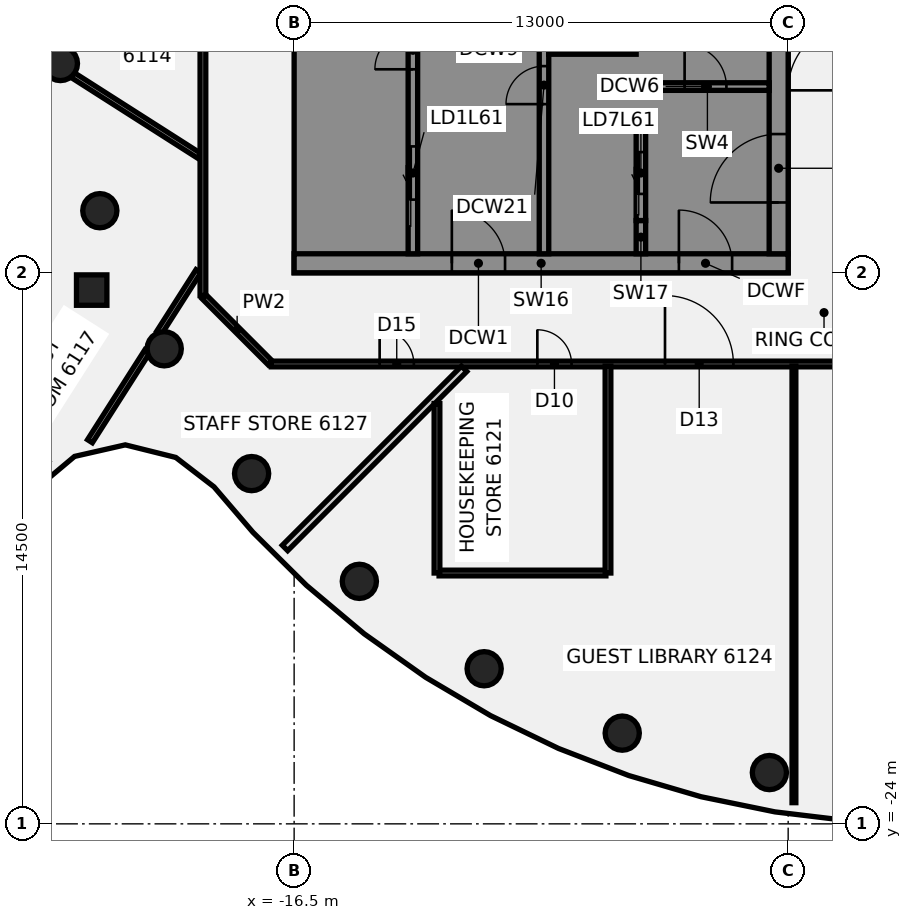
"""IFC4 building model, lengths in metres.
Left out: names, types, materials, properties, quantities, classifications, styles, units other than length and angle.
Written with IfcOpenShell. Run it as: python <this file> out.ifc"""

import sys

from ifc_helpers import new_model, si_unit, direction, frame, frame_2d, origin, origin_2d, place, context, subcontext, project, spatial, polyline, rectangle, circle, outline, extrude, element, fill, save


model = new_model("IFC4")
c1 = context("Model", 3, precision=1e-05, world=origin(), true_north=direction((0.0, 1.0)))
c2 = subcontext(c1, "Body", "Model", "MODEL_VIEW")
j1 = project(units=[si_unit("LENGTHUNIT", "METRE"), si_unit("PLANEANGLEUNIT", "RADIAN")], contexts=[c1])
p1 = place(None, origin())
s1 = spatial("IfcSite", under=j1, at=p1, CompositionType="ELEMENT")
p2 = place(p1, origin())
s2 = spatial("IfcBuilding", under=s1, at=p2, CompositionType="ELEMENT")
p3 = place(p2, frame((0.0, 0.0, 241.5)))
s3 = spatial("IfcBuildingStorey", under=s2, at=p3, CompositionType="ELEMENT", Elevation=241.5)
for number, where, z_axis, x_axis in (
    (1, (-22.651, -3.994, -0.14), (0.0, 0.0, 1.0), (1.0, 0.0, 0.0)),
    (2, (-21.613, -7.866, -0.14), (0.0, 0.0, 1.0), (1.0, 0.0, 0.0)),
    (3, (-19.919, -11.5, -0.14), (0.0, 0.0, 1.0), (1.0, 0.0, 0.0)),
    (4, (-17.619, -14.784, -0.14), (0.0, 0.0, 1.0), (1.0, 0.0, 0.0)),
    (5, (-14.784, -17.619, -0.14), (0.0, 0.0, 1.0), (1.0, 0.0, 0.0)),
    (6, (-11.5, -19.919, -0.14), (0.0, 0.0, 1.0), (1.0, 0.0, 0.0)),
    (7, (-7.866, -21.613, -0.14), (0.0, 0.0, 1.0), (1.0, 0.0, 0.0)),
    (8, (-3.994, -22.651, -0.14), (0.0, 0.0, 1.0), (1.0, 0.0, 0.0)),
):
    element("IfcColumn", number, at=place(p3, frame(where, z_axis=z_axis, x_axis=x_axis)), inside=s3, PredefinedType="COLUMN", context=c2, shape_type="SweptSolid", body=[
        extrude(circle(Radius=0.45, at=origin_2d()), origin(), (0.0, 0.0, 1.0), 3.6),
    ])
p4 = place(p3, frame((-21.827, -9.955, -0.139), z_axis=(0.050360136255, 0.001287809675, 0.998730293033), x_axis=(-0.841513383158, 0.538621535495, 0.041738081745)))
e9 = element("IfcColumn", 9, at=p4, inside=s3, PredefinedType="COLUMN", context=c2, shape_type="SweptSolid", body=[
    extrude(rectangle(XDim=0.8, YDim=0.8, at=origin_2d()), origin(), (0.0, 0.0, 1.0), 3.602),
])
p5 = place(p3, frame((-18.872, -10.128, 0.0), z_axis=(0.0, 0.0, 1.0), x_axis=(0.707106781187, -0.707106781187, 0.0)))
e10 = element("IfcWall", 10, at=p5, inside=s3, PredefinedType="PARTITIONING", context=c2, shape_type="SweptSolid", body=[
    extrude(rectangle(XDim=2.465, YDim=0.15, at=frame_2d((1.232, 0.0))), origin(), (0.0, 0.0, 1.0), 2.864),
])
p6 = place(p3, frame((-22.327, -4.298, 0.0), z_axis=(0.0, 0.0, 1.0), x_axis=(0.843073070403, -0.537799031201, 0.0)))
e11 = element("IfcWall", 11, at=p6, inside=s3, PredefinedType="PARTITIONING", context=c2, shape_type="SweptSolid", body=[
    extrude(rectangle(XDim=3.95, YDim=0.15, at=frame_2d((1.975, 0.0))), origin(), (0.0, 0.0, 1.0), 2.864),
])
p7 = place(p3, frame((-17.1, -11.9, 0.0), z_axis=(0.0, 0.0, 1.0), x_axis=(1.0, 0.0, 0.0)))
e12 = element("IfcWall", 12, at=p7, inside=s3, PredefinedType="PARTITIONING", context=c2, shape_type="SweptSolid", body=[
    extrude(rectangle(XDim=34.165, YDim=0.15, at=frame_2d((17.083, 0.0))), origin(), (0.0, 0.0, 1.0), 2.864),
])
p8 = place(p7, frame((7.0, 0.0, 0.0)))
e13 = element("IfcOpeningElement", 13, at=p8, cuts=e12, PredefinedType="OPENING", context=c2, shape_type="SweptSolid", body=[
    extrude(rectangle(XDim=0.9, YDim=2.1, at=frame_2d((0.45, 1.05))), frame((0.0, 0.085, 0.0), z_axis=(0.0, -1.0, 0.0), x_axis=(1.0, 0.0, 0.0)), (0.0, 0.0, 1.0), 0.17),
])
p9 = place(p7, frame((26.941, 0.0, 0.0)))
e14 = element("IfcOpeningElement", 14, at=p9, cuts=e12, PredefinedType="OPENING", context=c2, shape_type="SweptSolid", body=[
    extrude(rectangle(XDim=0.9, YDim=2.1, at=frame_2d((0.45, 1.05))), frame((0.0, 0.085, 0.0), z_axis=(0.0, -1.0, 0.0), x_axis=(1.0, 0.0, 0.0)), (0.0, 0.0, 1.0), 0.17),
])
p10 = place(p7, frame((19.152, 0.0, 0.0)))
e15 = element("IfcOpeningElement", 15, at=p10, cuts=e12, PredefinedType="OPENING", context=c2, shape_type="SweptSolid", body=[
    extrude(rectangle(XDim=1.8, YDim=2.1, at=frame_2d((0.9, 1.05))), frame((0.0, 0.085, 0.0), z_axis=(0.0, -1.0, 0.0), x_axis=(1.0, 0.0, 0.0)), (0.0, 0.0, 1.0), 0.17),
])
p11 = place(p7, frame((10.359, 0.0, 0.0)))
e16 = element("IfcOpeningElement", 16, at=p11, cuts=e12, PredefinedType="OPENING", context=c2, shape_type="SweptSolid", body=[
    extrude(rectangle(XDim=1.8, YDim=2.1, at=frame_2d((0.9, 1.05))), frame((0.0, 0.085, 0.0), z_axis=(0.0, -1.0, 0.0), x_axis=(1.0, 0.0, 0.0)), (0.0, 0.0, 1.0), 0.17),
])
p12 = place(p7, frame((31.7, 0.0, 0.0)))
e17 = element("IfcOpeningElement", 17, at=p12, cuts=e12, PredefinedType="OPENING", context=c2, shape_type="SweptSolid", body=[
    extrude(rectangle(XDim=0.9, YDim=2.1, at=frame_2d((0.45, 1.05))), frame((0.0, 0.085, 0.0), z_axis=(0.0, -1.0, 0.0), x_axis=(1.0, 0.0, 0.0)), (0.0, 0.0, 1.0), 0.17),
])
p13 = place(p7, frame((2.85, 0.0, 0.0)))
e18 = element("IfcOpeningElement", 18, at=p13, cuts=e12, PredefinedType="OPENING", context=c2, shape_type="SweptSolid", body=[
    extrude(rectangle(XDim=0.9, YDim=2.1, at=frame_2d((0.45, 1.05))), frame((0.0, 0.085, 0.0), z_axis=(0.0, -1.0, 0.0), x_axis=(1.0, 0.0, 0.0)), (0.0, 0.0, 1.0), 0.17),
])
p14 = place(p3, frame((-12.686, -17.4, 0.0), z_axis=(0.0, 0.0, 1.0), x_axis=(1.0, 0.0, 0.0)))
e19 = element("IfcWall", 19, at=p14, inside=s3, PredefinedType="PARTITIONING", context=c2, shape_type="SweptSolid", body=[
    extrude(rectangle(XDim=4.39, YDim=0.15, at=frame_2d((2.195, 0.0))), origin(), (0.0, 0.0, 1.0), 2.864),
])
p15 = place(p3, frame((-16.74, -16.74, 0.0), z_axis=(0.0, 0.0, 1.0), x_axis=(0.707106781187, 0.707106781187, 0.0)))
e20 = element("IfcWall", 20, at=p15, inside=s3, PredefinedType="PARTITIONING", context=c2, shape_type="SweptSolid", body=[
    extrude(rectangle(XDim=6.665, YDim=0.2, at=frame_2d((3.333, 0.0))), origin(), (0.0, 0.0, 1.0), 2.864),
])
p16 = place(p3, frame((-21.873, -13.932, 0.0), z_axis=(0.0, 0.0, 1.0), x_axis=(0.537802916329, 0.843070592055, 0.0)))
e21 = element("IfcWall", 21, at=p16, inside=s3, PredefinedType="PARTITIONING", context=c2, shape_type="SweptSolid", body=[
    extrude(rectangle(XDim=2.81, YDim=0.15, at=frame_2d((1.405, 0.0))), origin(), (0.0, 0.0, 1.0), 2.864),
])
p17 = place(p3, frame((-20.051, -11.075, 0.0), z_axis=(0.0, 0.0, 1.0), x_axis=(0.537912354102, 0.843000770643, 0.0)))
e22 = element("IfcWall", 22, at=p17, inside=s3, PredefinedType="PARTITIONING", context=c2, shape_type="SweptSolid", body=[
    extrude(rectangle(XDim=1.919, YDim=0.15, at=frame_2d((0.959, 0.0))), origin(), (0.0, 0.0, 1.0), 2.864),
])
p18 = place(p3, frame((-18.9, -10.1, 0.0), z_axis=(0.0, 0.0, 1.0), x_axis=(0.0, 1.0, 0.0)))
e23 = element("IfcWall", 23, at=p18, inside=s3, PredefinedType="PARTITIONING", context=c2, shape_type="SweptSolid", body=[
    extrude(rectangle(XDim=20.2, YDim=0.15, at=frame_2d((10.1, 0.0))), origin(), (0.0, 0.0, 1.0), 2.864),
])
p19 = place(p18, frame((13.484, 0.0, 0.0)))
e24 = element("IfcOpeningElement", 24, at=p19, cuts=e23, PredefinedType="OPENING", context=c2, shape_type="SweptSolid", body=[
    extrude(rectangle(XDim=1.8, YDim=2.1, at=frame_2d((0.9, 1.05))), frame((0.0, 0.085, 0.0), z_axis=(0.0, -1.0, 0.0), x_axis=(1.0, 0.0, 0.0)), (0.0, 0.0, 1.0), 0.17),
])
p20 = place(p18, frame((7.815, 0.0, 0.0)))
e25 = element("IfcOpeningElement", 25, at=p20, cuts=e23, PredefinedType="OPENING", context=c2, shape_type="SweptSolid", body=[
    extrude(rectangle(XDim=1.8, YDim=2.1, at=frame_2d((0.9, 1.05))), frame((0.0, 0.085, 0.0), z_axis=(0.0, -1.0, 0.0), x_axis=(1.0, 0.0, 0.0)), (0.0, 0.0, 1.0), 0.17),
])
p21 = place(p3, frame((-12.741, -17.4, 0.0), z_axis=(0.0, 0.0, 1.0), x_axis=(0.0, 1.0, 0.0)))
e26 = element("IfcWall", 26, at=p21, inside=s3, PredefinedType="PARTITIONING", context=c2, shape_type="SweptSolid", body=[
    extrude(rectangle(XDim=4.459, YDim=0.15, at=frame_2d((2.229, 0.0))), origin(), (0.0, 0.0, 1.0), 2.864),
])
p22 = place(p3, frame((-8.241, -17.4, 0.0), z_axis=(0.0, 0.0, 1.0), x_axis=(0.0, 1.0, 0.0)))
e27 = element("IfcWall", 27, at=p22, inside=s3, PredefinedType="PARTITIONING", context=c2, shape_type="SweptSolid", body=[
    extrude(rectangle(XDim=5.445, YDim=0.15, at=frame_2d((2.722, 0.0))), origin(), (0.0, 0.0, 1.0), 2.864),
])
p23 = place(p3, frame((-3.348, -23.442, 0.0), z_axis=(0.0, 0.0, 1.0), x_axis=(0.0, 1.0, 0.0)))
e28 = element("IfcWall", 28, at=p23, inside=s3, PredefinedType="PARTITIONING", context=c2, shape_type="SweptSolid", body=[
    extrude(rectangle(XDim=11.487, YDim=0.1, at=frame_2d((5.744, 0.0))), origin(), (0.0, 0.0, 1.0), 2.864),
])
p24 = place(p3, frame((-16.5, -9.25, 0.0), z_axis=(0.0, 0.0, 1.0), x_axis=(1.0, 0.0, 0.0)))
e29 = element("IfcWall", 29, at=p24, inside=s3, PredefinedType="SHEAR", context=c2, shape_type="SweptSolid", body=[
    extrude(rectangle(XDim=13.0, YDim=0.5, at=frame_2d((6.5, 0.0))), origin(), (0.0, 0.0, 1.0), 3.46),
])
p25 = place(p24, frame((4.15, 0.0, 0.0)))
e30 = element("IfcOpeningElement", 30, at=p25, cuts=e29, PredefinedType="OPENING", context=c2, shape_type="SweptSolid", body=[
    extrude(rectangle(XDim=1.4, YDim=2.1, at=frame_2d((0.7, 1.05))), frame((0.0, 0.26, 0.0), z_axis=(0.0, -1.0, 0.0), x_axis=(1.0, 0.0, 0.0)), (0.0, 0.0, 1.0), 0.52),
])
p26 = place(p24, frame((10.125, 0.0, 0.0)))
e31 = element("IfcOpeningElement", 31, at=p26, cuts=e29, PredefinedType="OPENING", context=c2, shape_type="SweptSolid", body=[
    extrude(rectangle(XDim=1.4, YDim=2.1, at=frame_2d((0.7, 1.05))), frame((0.0, 0.26, 0.0), z_axis=(0.0, -1.0, 0.0), x_axis=(1.0, 0.0, 0.0)), (0.0, 0.0, 1.0), 0.52),
])
p27 = place(p3, origin())
e32 = element("IfcWall", 32, at=p27, inside=s3, PredefinedType="SHEAR", context=c2, shape_type="SweptSolid", body=[
    extrude(outline(polyline([(-13.5, -8.125), (-16.0, -8.125), (-16.0, -5.625), (-13.5, -5.625), (-13.5, -5.375), (-16.0, -5.375), (-16.0, 5.375), (-13.5, 5.375), (-13.5, 5.625), (-16.0, 5.625), (-16.0, 8.125), (-13.5, 8.125), (-13.5, 9.0), (-16.0, 9.0), (-16.5, 9.0), (-16.5, -9.0), (-16.0, -9.0), (-13.5, -9.0), (-13.5, -8.125)])), origin(), (0.0, 0.0, 1.0), 3.46),
])
p28 = place(p3, origin())
e33 = element("IfcWall", 33, at=p28, inside=s3, PredefinedType="SHEAR", context=c2, shape_type="SweptSolid", body=[
    extrude(outline(polyline([(-9.8, -5.375), (-9.8, -5.625), (-7.5, -5.625), (-7.25, -5.625), (-7.25, 9.0), (-7.5, 9.0), (-9.8, 9.0), (-9.8, 8.125), (-7.5, 8.125), (-7.5, 5.625), (-9.8, 5.625), (-9.8, 5.375), (-7.5, 5.375), (-7.5, 2.875), (-9.8, 2.875), (-9.8, 2.625), (-7.5, 2.625), (-7.5, -5.375), (-9.8, -5.375)])), origin(), (0.0, 0.0, 1.0), 3.46),
])
p29 = place(p3, origin())
e34 = element("IfcWall", 34, at=p29, inside=s3, PredefinedType="SHEAR", context=c2, shape_type="SweptSolid", body=[
    extrude(outline(polyline([(-7.5, -8.125), (-9.55, -8.125), (-9.55, -5.625), (-9.8, -5.625), (-9.8, -8.125), (-9.8, -9.0), (-7.5, -9.0), (-7.5, -8.125)])), origin(), (0.0, 0.0, 1.0), 3.46),
])
p30 = place(p3, frame((-7.375, -9.0, 0.0), z_axis=(0.0, 0.0, 1.0), x_axis=(0.0, 1.0, 0.0)))
e35 = element("IfcWall", 35, at=p30, inside=s3, PredefinedType="SHEAR", context=c2, shape_type="SweptSolid", body=[
    extrude(rectangle(XDim=0.875, YDim=0.25, at=frame_2d((0.438, 0.0))), origin(), (0.0, 0.0, 1.0), 3.46),
])
p31 = place(p3, frame((-13.375, -9.0, 0.0), z_axis=(0.0, 0.0, 1.0), x_axis=(0.0, 1.0, 0.0)))
e36 = element("IfcWall", 36, at=p31, inside=s3, PredefinedType="SHEAR", context=c2, shape_type="SweptSolid", body=[
    extrude(rectangle(XDim=18.0, YDim=0.25, at=frame_2d((9.0, 0.0))), origin(), (0.0, 0.0, 1.0), 3.46),
])
p32 = place(p31, frame((1.425, 0.0, 0.0)))
e37 = element("IfcOpeningElement", 37, at=p32, cuts=e36, PredefinedType="OPENING", context=c2, shape_type="SweptSolid", body=[
    extrude(rectangle(XDim=1.4, YDim=2.1, at=frame_2d((0.7, 1.05))), frame((0.0, 0.135, 0.0), z_axis=(0.0, -1.0, 0.0), x_axis=(1.0, 0.0, 0.0)), (0.0, 0.0, 1.0), 0.27),
])
p33 = place(p31, frame((4.854, 0.0, 0.0)))
e38 = element("IfcOpeningElement", 38, at=p33, cuts=e36, PredefinedType="OPENING", context=c2, shape_type="SweptSolid", body=[
    extrude(rectangle(XDim=1.0, YDim=2.1, at=frame_2d((0.5, 1.05))), frame((0.0, 0.135, 0.0), z_axis=(0.0, -1.0, 0.0), x_axis=(1.0, 0.0, 0.0)), (0.0, 0.0, 1.0), 0.27),
])
p34 = place(p31, frame((10.354, 0.0, 0.0)))
e39 = element("IfcOpeningElement", 39, at=p34, cuts=e36, PredefinedType="OPENING", context=c2, shape_type="SweptSolid", body=[
    extrude(rectangle(XDim=1.0, YDim=2.1, at=frame_2d((0.5, 1.05))), frame((0.0, 0.135, 0.0), z_axis=(0.0, -1.0, 0.0), x_axis=(1.0, 0.0, 0.0)), (0.0, 0.0, 1.0), 0.27),
])
p35 = place(p3, frame((-9.925, -9.0, 0.0), z_axis=(0.0, 0.0, 1.0), x_axis=(0.0, 1.0, 0.0)))
e40 = element("IfcWall", 40, at=p35, inside=s3, PredefinedType="SHEAR", context=c2, shape_type="SweptSolid", body=[
    extrude(rectangle(XDim=18.0, YDim=0.25, at=frame_2d((9.0, 0.0))), origin(), (0.0, 0.0, 1.0), 3.46),
])
p36 = place(p35, frame((12.575, 0.0, 0.0)))
e41 = element("IfcOpeningElement", 41, at=p36, cuts=e40, PredefinedType="OPENING", context=c2, shape_type="SweptSolid", body=[
    extrude(rectangle(XDim=1.1, YDim=2.1, at=frame_2d((0.55, 1.05))), frame((0.0, 0.135, 0.0), z_axis=(0.0, -1.0, 0.0), x_axis=(1.0, 0.0, 0.0)), (0.0, 0.0, 1.0), 0.27),
])
p37 = place(p35, frame((15.325, 0.0, 0.0)))
e42 = element("IfcOpeningElement", 42, at=p37, cuts=e40, PredefinedType="OPENING", context=c2, shape_type="SweptSolid", body=[
    extrude(rectangle(XDim=1.1, YDim=2.1, at=frame_2d((0.55, 1.05))), frame((0.0, 0.135, 0.0), z_axis=(0.0, -1.0, 0.0), x_axis=(1.0, 0.0, 0.0)), (0.0, 0.0, 1.0), 0.27),
])
p38 = place(p35, frame((3.938, 0.0, 0.0)))
e43 = element("IfcOpeningElement", 43, at=p38, cuts=e40, PredefinedType="OPENING", context=c2, shape_type="SweptSolid", body=[
    extrude(rectangle(XDim=1.0, YDim=2.1, at=frame_2d((0.5, 1.05))), frame((0.0, 0.135, 0.0), z_axis=(0.0, -1.0, 0.0), x_axis=(1.0, 0.0, 0.0)), (0.0, 0.0, 1.0), 0.27),
])
p39 = place(p35, frame((6.688, 0.0, 0.0)))
e44 = element("IfcOpeningElement", 44, at=p39, cuts=e40, PredefinedType="OPENING", context=c2, shape_type="SweptSolid", body=[
    extrude(rectangle(XDim=1.0, YDim=2.1, at=frame_2d((0.5, 1.05))), frame((0.0, 0.135, 0.0), z_axis=(0.0, -1.0, 0.0), x_axis=(1.0, 0.0, 0.0)), (0.0, 0.0, 1.0), 0.27),
])
p40 = place(p35, frame((9.875, 0.0, 0.0)))
e45 = element("IfcOpeningElement", 45, at=p40, cuts=e40, PredefinedType="OPENING", context=c2, shape_type="SweptSolid", body=[
    extrude(rectangle(XDim=1.0, YDim=2.1, at=frame_2d((0.5, 1.05))), frame((0.0, 0.135, 0.0), z_axis=(0.0, -1.0, 0.0), x_axis=(1.0, 0.0, 0.0)), (0.0, 0.0, 1.0), 0.27),
])
p41 = place(p3, frame((-7.375, -8.125, 0.0), z_axis=(0.0, 0.0, 1.0), x_axis=(0.0, 1.0, 0.0)))
e46 = element("IfcWall", 46, at=p41, inside=s3, PredefinedType="SHEAR", context=c2, shape_type="SweptSolid", body=[
    extrude(rectangle(XDim=2.5, YDim=0.25, at=frame_2d((1.25, 0.0))), origin(), (0.0, 0.0, 1.0), 3.46),
])
p42 = place(p41, frame((0.7, 0.0, 0.0)))
e47 = element("IfcOpeningElement", 47, at=p42, cuts=e46, PredefinedType="OPENING", context=c2, shape_type="SweptSolid", body=[
    extrude(rectangle(XDim=1.1, YDim=2.1, at=frame_2d((0.55, 1.05))), frame((0.0, 0.135, 0.0), z_axis=(0.0, -1.0, 0.0), x_axis=(1.0, 0.0, 0.0)), (0.0, 0.0, 1.0), 0.27),
])
p43 = place(p3, frame((-3.75, -9.0, 0.0), z_axis=(0.0, 0.0, 1.0), x_axis=(0.0, 1.0, 0.0)))
e48 = element("IfcWall", 48, at=p43, inside=s3, PredefinedType="SHEAR", context=c2, shape_type="SweptSolid", body=[
    extrude(rectangle(XDim=18.0, YDim=0.5, at=frame_2d((9.0, 0.0))), origin(), (0.0, 0.0, 1.0), 3.46),
])
p44 = place(p43, frame((1.35, 0.0, 0.0)))
e49 = element("IfcOpeningElement", 49, at=p44, cuts=e48, PredefinedType="OPENING", context=c2, shape_type="SweptSolid", body=[
    extrude(rectangle(XDim=1.8, YDim=2.1, at=frame_2d((0.9, 1.05))), frame((0.0, 0.26, 0.0), z_axis=(0.0, -1.0, 0.0), x_axis=(1.0, 0.0, 0.0)), (0.0, 0.0, 1.0), 0.52),
])
p45 = place(p43, frame((12.75, 0.0, 0.0)))
e50 = element("IfcOpeningElement", 50, at=p45, cuts=e48, PredefinedType="OPENING", context=c2, shape_type="SweptSolid", body=[
    extrude(rectangle(XDim=1.0, YDim=2.1, at=frame_2d((0.5, 1.05))), frame((0.0, 0.26, 0.0), z_axis=(0.0, -1.0, 0.0), x_axis=(1.0, 0.0, 0.0)), (0.0, 0.0, 1.0), 0.52),
])
p46 = place(p43, frame((16.274, 0.0, 0.0)))
e51 = element("IfcOpeningElement", 51, at=p46, cuts=e48, PredefinedType="OPENING", context=c2, shape_type="SweptSolid", body=[
    extrude(rectangle(XDim=1.0, YDim=2.1, at=frame_2d((0.5, 1.05))), frame((0.0, 0.26, 0.0), z_axis=(0.0, -1.0, 0.0), x_axis=(1.0, 0.0, 0.0)), (0.0, 0.0, 1.0), 0.52),
])
p47 = place(p3, frame((-7.25, -4.6, 0.0), z_axis=(0.0, 0.0, 1.0), x_axis=(1.0, 0.0, 0.0)))
e52 = element("IfcWall", 52, at=p47, inside=s3, PredefinedType="SHEAR", context=c2, shape_type="SweptSolid", body=[
    extrude(rectangle(XDim=3.25, YDim=0.2, at=frame_2d((1.625, 0.0))), origin(), (0.0, 0.0, 1.0), 3.46),
])
p48 = place(p47, frame((1.025, 0.0, 0.0)))
e53 = element("IfcOpeningElement", 53, at=p48, cuts=e52, PredefinedType="OPENING", context=c2, shape_type="SweptSolid", body=[
    extrude(rectangle(XDim=1.1, YDim=2.1, at=frame_2d((0.55, 1.05))), frame((0.0, 0.11, 0.0), z_axis=(0.0, -1.0, 0.0), x_axis=(1.0, 0.0, 0.0)), (0.0, 0.0, 1.0), 0.22),
])
p49 = place(p3, frame((-9.8, -3.625, 0.0), z_axis=(0.0, 0.0, 1.0), x_axis=(1.0, 0.0, 0.0)))
e54 = element("IfcWall", 54, at=p49, inside=s3, PredefinedType="PARTITIONING", context=c2, shape_type="SweptSolid", body=[
    extrude(rectangle(XDim=2.3, YDim=0.25, at=frame_2d((1.15, 0.0))), origin(), (0.0, 0.0, 1.0), 3.46),
])
p50 = place(p8, frame((0.9, 0.0, 0.0), z_axis=(0.0, 0.0, 1.0), x_axis=(-1.0, 0.0, 0.0)))
e55 = element("IfcDoor", 55, at=p50, inside=s3, OperationType="SINGLE_SWING_LEFT", PredefinedType="DOOR", context=c2, shape_type="SweptSolid", body=[
    extrude(rectangle(XDim=0.9, YDim=2.1, at=frame_2d((0.45, 1.05))), frame((0.0, 0.025, 0.0), z_axis=(0.0, -1.0, 0.0), x_axis=(1.0, 0.0, 0.0)), (0.0, 0.0, 1.0), 0.05),
])
fill(e13, e55)
p51 = place(p11, frame((1.8, 0.0, 0.0), z_axis=(0.0, 0.0, 1.0), x_axis=(-1.0, 0.0, 0.0)))
e56 = element("IfcDoor", 56, at=p51, inside=s3, OperationType="DOUBLE_DOOR_SINGLE_SWING", PredefinedType="DOOR", context=c2, shape_type="SweptSolid", body=[
    extrude(rectangle(XDim=1.8, YDim=2.1, at=frame_2d((0.9, 1.05))), frame((0.0, 0.025, 0.0), z_axis=(0.0, -1.0, 0.0), x_axis=(1.0, 0.0, 0.0)), (0.0, 0.0, 1.0), 0.05),
])
fill(e16, e56)
p52 = place(p13, frame((0.9, 0.0, 0.0), z_axis=(0.0, 0.0, 1.0), x_axis=(-1.0, 0.0, 0.0)))
e57 = element("IfcDoor", 57, at=p52, inside=s3, OperationType="SINGLE_SWING_LEFT", PredefinedType="DOOR", context=c2, shape_type="SweptSolid", body=[
    extrude(rectangle(XDim=0.9, YDim=2.1, at=frame_2d((0.45, 1.05))), frame((0.0, 0.025, 0.0), z_axis=(0.0, -1.0, 0.0), x_axis=(1.0, 0.0, 0.0)), (0.0, 0.0, 1.0), 0.05),
])
fill(e18, e57)
p53 = place(p25, origin())
e58 = element("IfcDoor", 58, at=p53, inside=s3, OperationType="SINGLE_SWING_LEFT", PredefinedType="DOOR", context=c2, shape_type="SweptSolid", body=[
    extrude(rectangle(XDim=1.4, YDim=2.1, at=frame_2d((0.7, 1.05))), frame((0.0, 0.025, 0.0), z_axis=(0.0, -1.0, 0.0), x_axis=(1.0, 0.0, 0.0)), (0.0, 0.0, 1.0), 0.05),
])
fill(e30, e58)
p54 = place(p26, origin())
e59 = element("IfcDoor", 59, at=p54, inside=s3, OperationType="SINGLE_SWING_LEFT", PredefinedType="DOOR", context=c2, shape_type="SweptSolid", body=[
    extrude(rectangle(XDim=1.4, YDim=2.1, at=frame_2d((0.7, 1.05))), frame((0.0, 0.025, 0.0), z_axis=(0.0, -1.0, 0.0), x_axis=(1.0, 0.0, 0.0)), (0.0, 0.0, 1.0), 0.05),
])
fill(e31, e59)
p55 = place(p44, origin())
e60 = element("IfcDoor", 60, at=p55, inside=s3, OperationType="SINGLE_SWING_LEFT", PredefinedType="DOOR", context=c2, shape_type="SweptSolid", body=[
    extrude(rectangle(XDim=1.8, YDim=2.1, at=frame_2d((0.9, 1.05))), frame((0.0, 0.025, 0.0), z_axis=(0.0, -1.0, 0.0), x_axis=(1.0, 0.0, 0.0)), (0.0, 0.0, 1.0), 0.05),
])
fill(e49, e60)
p56 = place(p48, origin())
e61 = element("IfcDoor", 61, at=p56, inside=s3, OperationType="SINGLE_SWING_LEFT", PredefinedType="DOOR", context=c2, shape_type="SweptSolid", body=[
    extrude(rectangle(XDim=1.1, YDim=2.1, at=frame_2d((0.55, 1.05))), frame((0.0, 0.025, 0.0), z_axis=(0.0, -1.0, 0.0), x_axis=(1.0, 0.0, 0.0)), (0.0, 0.0, 1.0), 0.05),
])
fill(e53, e61)
p57 = place(p32, origin())
e62 = element("IfcDoor", 62, at=p57, inside=s3, OperationType="SLIDING_TO_LEFT", PredefinedType="DOOR", context=c2, shape_type="SweptSolid", body=[
    extrude(rectangle(XDim=1.4, YDim=2.1, at=frame_2d((0.7, 1.05))), frame((0.0, 0.025, 0.0), z_axis=(0.0, -1.0, 0.0), x_axis=(1.0, 0.0, 0.0)), (0.0, 0.0, 1.0), 0.05),
])
fill(e37, e62)
p58 = place(p42, origin())
e63 = element("IfcDoor", 63, at=p58, inside=s3, OperationType="SLIDING_TO_LEFT", PredefinedType="DOOR", context=c2, shape_type="SweptSolid", body=[
    extrude(rectangle(XDim=1.1, YDim=2.1, at=frame_2d((0.55, 1.05))), frame((0.0, 0.025, 0.0), z_axis=(0.0, -1.0, 0.0), x_axis=(1.0, 0.0, 0.0)), (0.0, 0.0, 1.0), 0.05),
])
fill(e47, e63)
p59 = place(p33, origin())
e64 = element("IfcDoor", 64, at=p59, inside=s3, OperationType="SINGLE_SWING_LEFT", PredefinedType="DOOR", context=c2, shape_type="SweptSolid", body=[
    extrude(rectangle(XDim=1.0, YDim=2.1, at=frame_2d((0.5, 1.05))), frame((0.0, 0.025, 0.0), z_axis=(0.0, -1.0, 0.0), x_axis=(1.0, 0.0, 0.0)), (0.0, 0.0, 1.0), 0.05),
])
fill(e38, e64)
p60 = place(p38, origin())
e65 = element("IfcDoor", 65, at=p60, inside=s3, OperationType="SINGLE_SWING_LEFT", PredefinedType="DOOR", context=c2, shape_type="SweptSolid", body=[
    extrude(rectangle(XDim=1.0, YDim=2.1, at=frame_2d((0.5, 1.05))), frame((0.0, 0.025, 0.0), z_axis=(0.0, -1.0, 0.0), x_axis=(1.0, 0.0, 0.0)), (0.0, 0.0, 1.0), 0.05),
])
fill(e43, e65)
save(model, sys.argv[1])
